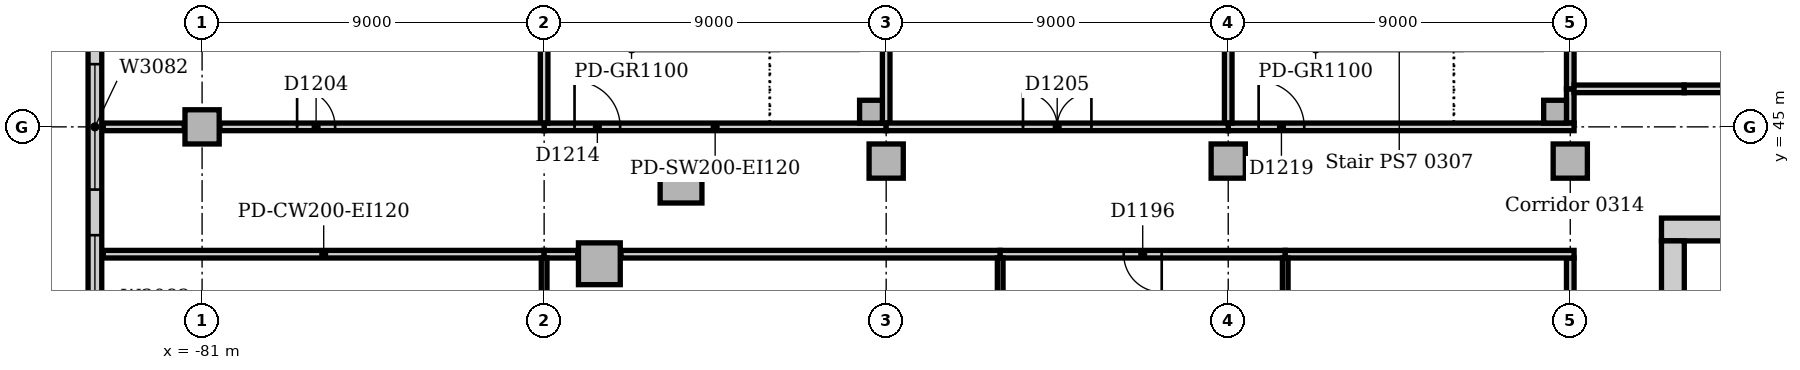
"""IFC4 building model, lengths in metres.
Left out: names, types, materials, properties, quantities, classifications, styles, units other than length and angle.
Written with IfcOpenShell. Run it as: python <this file> out.ifc"""

import sys

from ifc_helpers import new_model, si_unit, direction, frame, frame_2d, origin, origin_2d, place, context, subcontext, project, spatial, rectangle, extrude, element, fill, save


model = new_model("IFC4")
c1 = context("Model", 3, precision=1e-05, world=origin(), true_north=direction((0.0, 1.0)))
c2 = subcontext(c1, "Body", "Model", "MODEL_VIEW")
j1 = project(units=[si_unit("LENGTHUNIT", "METRE"), si_unit("PLANEANGLEUNIT", "RADIAN")], contexts=[c1])
p1 = place(None, origin())
s1 = spatial("IfcSite", under=j1, at=p1, CompositionType="ELEMENT")
p2 = place(p1, origin())
s2 = spatial("IfcBuilding", under=s1, at=p2, CompositionType="ELEMENT")
p3 = place(p2, frame((0.0, 0.0, 16.0)))
s3 = spatial("IfcBuildingStorey", under=s2, at=p3, CompositionType="ELEMENT", Elevation=16.0)
p4 = place(p3, frame((-30.9, 42.3, 0.0), z_axis=(0.0, 0.0, 1.0), x_axis=(-1.0, 0.0, 0.0)))
e1 = element("IfcWall", 1, at=p4, inside=s3, PredefinedType="SOLIDWALL", context=c2, shape_type="SweptSolid", body=[
    extrude(rectangle(XDim=11.7, YDim=0.6, at=frame_2d((5.85, 0.0))), origin(), (0.0, 0.0, 1.0), 5.0),
])
p5 = place(p3, frame((-42.3, 42.0, 0.0), z_axis=(0.0, 0.0, 1.0), x_axis=(0.0, -1.0, 0.0)))
e2 = element("IfcWall", 2, at=p5, inside=s3, PredefinedType="SOLIDWALL", context=c2, shape_type="SweptSolid", body=[
    extrude(rectangle(XDim=11.5, YDim=0.6, at=frame_2d((5.75, 0.0))), origin(), (0.0, 0.0, 1.0), 5.0),
])
p6 = place(p5, frame((8.85, 0.0, 0.0)))
e3 = element("IfcOpeningElement", 3, at=p6, cuts=e2, PredefinedType="OPENING", context=c2, shape_type="SweptSolid", body=[
    extrude(rectangle(XDim=1.8, YDim=2.1, at=frame_2d((0.9, 1.05))), frame((0.0, 0.31, 0.0), z_axis=(0.0, -1.0, 0.0), x_axis=(1.0, 0.0, 0.0)), (0.0, 0.0, 1.0), 0.62),
])
for number, where, z_axis, x_axis in (
    (4, (-68.398, 43.547, 0.0), (0.0, 0.0, 1.0), (1.0, 0.0, 0.0)),
    (5, (-70.547, 41.398, 0.0), (0.0, 0.0, 1.0), (1.0, 0.0, 0.0)),
):
    element("IfcColumn", number, at=place(p3, frame(where, z_axis=z_axis, x_axis=x_axis)), inside=s3, PredefinedType="COLUMN", context=c2, shape_type="SweptSolid", body=[
        extrude(rectangle(XDim=1.1, YDim=1.1, at=origin_2d()), origin(), (0.0, 0.0, 1.0), 4.7),
    ])
for number, where, z_axis, x_axis in (
    (6, (-63.0, 44.1, 0.0), (0.0, 0.0, 1.0), (1.0, 0.0, 0.0)),
    (7, (-54.0, 44.1, 0.0), (0.0, 0.0, 1.0), (1.0, 0.0, 0.0)),
    (8, (-45.0, 44.1, 0.0), (0.0, 0.0, 1.0), (1.0, 0.0, 0.0)),
    (9, (-81.0, 45.0, 0.0), (0.0, 0.0, 1.0), (1.0, 0.0, 0.0)),
):
    element("IfcColumn", number, at=place(p3, frame(where, z_axis=z_axis, x_axis=x_axis)), inside=s3, PredefinedType="COLUMN", context=c2, shape_type="SweptSolid", body=[
        extrude(rectangle(XDim=0.9, YDim=0.9, at=origin_2d()), origin(), (0.0, 0.0, 1.0), 4.7),
    ])
p7 = place(p3, frame((-83.82, 54.0, 0.0), z_axis=(0.0, 0.0, 1.0), x_axis=(0.0, -1.0, 0.0)))
e10 = element("IfcWall", 10, at=p7, inside=s3, PredefinedType="STANDARD", context=c2, shape_type="SweptSolid", body=[
    extrude(rectangle(XDim=63.0, YDim=0.36, at=frame_2d((31.5, 0.0))), origin(), (0.0, 0.0, 1.0), 4.7),
])
p8 = place(p7, frame((2.85, 0.0, 0.9)))
e11 = element("IfcOpeningElement", 11, at=p8, cuts=e10, PredefinedType="OPENING", context=c2, shape_type="SweptSolid", body=[
    extrude(rectangle(XDim=3.3, YDim=2.4, at=frame_2d((1.65, 1.2))), frame((0.0, 0.19, 0.0), z_axis=(0.0, -1.0, 0.0), x_axis=(1.0, 0.0, 0.0)), (0.0, 0.0, 1.0), 0.38),
])
p9 = place(p7, frame((7.35, 0.0, 0.9)))
e12 = element("IfcOpeningElement", 12, at=p9, cuts=e10, PredefinedType="OPENING", context=c2, shape_type="SweptSolid", body=[
    extrude(rectangle(XDim=3.3, YDim=2.4, at=frame_2d((1.65, 1.2))), frame((0.0, 0.19, 0.0), z_axis=(0.0, -1.0, 0.0), x_axis=(1.0, 0.0, 0.0)), (0.0, 0.0, 1.0), 0.38),
])
p10 = place(p7, frame((11.85, 0.0, 0.9)))
e13 = element("IfcOpeningElement", 13, at=p10, cuts=e10, PredefinedType="OPENING", context=c2, shape_type="SweptSolid", body=[
    extrude(rectangle(XDim=3.3, YDim=2.4, at=frame_2d((1.65, 1.2))), frame((0.0, 0.19, 0.0), z_axis=(0.0, -1.0, 0.0), x_axis=(1.0, 0.0, 0.0)), (0.0, 0.0, 1.0), 0.38),
])
p11 = place(p7, frame((16.35, 0.0, 0.9)))
e14 = element("IfcOpeningElement", 14, at=p11, cuts=e10, PredefinedType="OPENING", context=c2, shape_type="SweptSolid", body=[
    extrude(rectangle(XDim=3.3, YDim=2.4, at=frame_2d((1.65, 1.2))), frame((0.0, 0.19, 0.0), z_axis=(0.0, -1.0, 0.0), x_axis=(1.0, 0.0, 0.0)), (0.0, 0.0, 1.0), 0.38),
])
p12 = place(p7, frame((20.85, 0.0, 0.9)))
e15 = element("IfcOpeningElement", 15, at=p12, cuts=e10, PredefinedType="OPENING", context=c2, shape_type="SweptSolid", body=[
    extrude(rectangle(XDim=3.3, YDim=2.4, at=frame_2d((1.65, 1.2))), frame((0.0, 0.19, 0.0), z_axis=(0.0, -1.0, 0.0), x_axis=(1.0, 0.0, 0.0)), (0.0, 0.0, 1.0), 0.38),
])
p13 = place(p7, frame((25.35, 0.0, 0.9)))
e16 = element("IfcOpeningElement", 16, at=p13, cuts=e10, PredefinedType="OPENING", context=c2, shape_type="SweptSolid", body=[
    extrude(rectangle(XDim=3.3, YDim=2.4, at=frame_2d((1.65, 1.2))), frame((0.0, 0.19, 0.0), z_axis=(0.0, -1.0, 0.0), x_axis=(1.0, 0.0, 0.0)), (0.0, 0.0, 1.0), 0.38),
])
p14 = place(p7, frame((29.85, 0.0, 0.9)))
e17 = element("IfcOpeningElement", 17, at=p14, cuts=e10, PredefinedType="OPENING", context=c2, shape_type="SweptSolid", body=[
    extrude(rectangle(XDim=3.3, YDim=2.4, at=frame_2d((1.65, 1.2))), frame((0.0, 0.19, 0.0), z_axis=(0.0, -1.0, 0.0), x_axis=(1.0, 0.0, 0.0)), (0.0, 0.0, 1.0), 0.38),
])
p15 = place(p7, frame((34.35, 0.0, 0.9)))
e18 = element("IfcOpeningElement", 18, at=p15, cuts=e10, PredefinedType="OPENING", context=c2, shape_type="SweptSolid", body=[
    extrude(rectangle(XDim=3.3, YDim=2.4, at=frame_2d((1.65, 1.2))), frame((0.0, 0.19, 0.0), z_axis=(0.0, -1.0, 0.0), x_axis=(1.0, 0.0, 0.0)), (0.0, 0.0, 1.0), 0.38),
])
p16 = place(p7, frame((38.85, 0.0, 0.9)))
e19 = element("IfcOpeningElement", 19, at=p16, cuts=e10, PredefinedType="OPENING", context=c2, shape_type="SweptSolid", body=[
    extrude(rectangle(XDim=3.3, YDim=2.4, at=frame_2d((1.65, 1.2))), frame((0.0, 0.19, 0.0), z_axis=(0.0, -1.0, 0.0), x_axis=(1.0, 0.0, 0.0)), (0.0, 0.0, 1.0), 0.38),
])
p17 = place(p7, frame((43.35, 0.0, 0.9)))
e20 = element("IfcOpeningElement", 20, at=p17, cuts=e10, PredefinedType="OPENING", context=c2, shape_type="SweptSolid", body=[
    extrude(rectangle(XDim=3.3, YDim=2.4, at=frame_2d((1.65, 1.2))), frame((0.0, 0.19, 0.0), z_axis=(0.0, -1.0, 0.0), x_axis=(1.0, 0.0, 0.0)), (0.0, 0.0, 1.0), 0.38),
])
p18 = place(p7, frame((47.85, 0.0, 0.9)))
e21 = element("IfcOpeningElement", 21, at=p18, cuts=e10, PredefinedType="OPENING", context=c2, shape_type="SweptSolid", body=[
    extrude(rectangle(XDim=3.3, YDim=2.4, at=frame_2d((1.65, 1.2))), frame((0.0, 0.19, 0.0), z_axis=(0.0, -1.0, 0.0), x_axis=(1.0, 0.0, 0.0)), (0.0, 0.0, 1.0), 0.38),
])
p19 = place(p7, frame((52.35, 0.0, 0.9)))
e22 = element("IfcOpeningElement", 22, at=p19, cuts=e10, PredefinedType="OPENING", context=c2, shape_type="SweptSolid", body=[
    extrude(rectangle(XDim=3.3, YDim=2.4, at=frame_2d((1.65, 1.2))), frame((0.0, 0.19, 0.0), z_axis=(0.0, -1.0, 0.0), x_axis=(1.0, 0.0, 0.0)), (0.0, 0.0, 1.0), 0.38),
])
p20 = place(p7, frame((56.85, 0.0, 0.9)))
e23 = element("IfcOpeningElement", 23, at=p20, cuts=e10, PredefinedType="OPENING", context=c2, shape_type="SweptSolid", body=[
    extrude(rectangle(XDim=3.3, YDim=2.4, at=frame_2d((1.65, 1.2))), frame((0.0, 0.19, 0.0), z_axis=(0.0, -1.0, 0.0), x_axis=(1.0, 0.0, 0.0)), (0.0, 0.0, 1.0), 0.38),
])
for number, where, z_axis, x_axis in (
    (24, (-63.4, 45.4, 0.0), (0.0, 0.0, 1.0), (1.0, 0.0, 0.0)),
    (25, (-45.4, 45.4, 0.0), (0.0, 0.0, 1.0), (1.0, 0.0, 0.0)),
):
    element("IfcColumn", number, at=place(p3, frame(where, z_axis=z_axis, x_axis=x_axis)), inside=s3, PredefinedType="COLUMN", context=c2, shape_type="SweptSolid", body=[
        extrude(rectangle(XDim=0.6, YDim=0.6, at=origin_2d()), origin(), (0.0, 0.0, 1.0), 5.0),
    ])
p21 = place(p3, frame((-72.0, 45.0, 0.0), z_axis=(0.0, 0.0, 1.0), x_axis=(1.0, 0.0, 0.0)))
e26 = element("IfcWall", 26, at=p21, inside=s3, PredefinedType="SOLIDWALL", context=c2, shape_type="SweptSolid", body=[
    extrude(rectangle(XDim=9.0, YDim=0.2, at=frame_2d((4.5, 0.0))), origin(), (0.0, 0.0, 1.0), 4.7),
])
p22 = place(p21, frame((0.8, 0.0, 0.0)))
e27 = element("IfcOpeningElement", 27, at=p22, cuts=e26, PredefinedType="OPENING", context=c2, shape_type="SweptSolid", body=[
    extrude(rectangle(XDim=1.2, YDim=2.1, at=frame_2d((0.6, 1.05))), frame((0.0, 0.11, 0.0), z_axis=(0.0, -1.0, 0.0), x_axis=(1.0, 0.0, 0.0)), (0.0, 0.0, 1.0), 0.22),
])
p23 = place(p3, frame((-72.0, 45.1, 0.0), z_axis=(0.0, 0.0, 1.0), x_axis=(0.0, 1.0, 0.0)))
e28 = element("IfcWall", 28, at=p23, inside=s3, PredefinedType="SOLIDWALL", context=c2, shape_type="SweptSolid", body=[
    extrude(rectangle(XDim=5.25, YDim=0.2, at=frame_2d((2.625, 0.0))), origin(), (0.0, 0.0, 1.0), 4.7),
])
p24 = place(p3, frame((-63.0, 45.1, 0.0), z_axis=(0.0, 0.0, 1.0), x_axis=(0.0, 1.0, 0.0)))
e29 = element("IfcWall", 29, at=p24, inside=s3, PredefinedType="SOLIDWALL", context=c2, shape_type="SweptSolid", body=[
    extrude(rectangle(XDim=5.15, YDim=0.2, at=frame_2d((2.575, 0.0))), origin(), (0.0, 0.0, 1.0), 4.7),
])
p25 = place(p3, frame((-45.0, 45.1, 0.0), z_axis=(0.0, 0.0, 1.0), x_axis=(0.0, 1.0, 0.0)))
e30 = element("IfcWall", 30, at=p25, inside=s3, PredefinedType="SOLIDWALL", context=c2, shape_type="SweptSolid", body=[
    extrude(rectangle(XDim=0.9, YDim=0.2, at=frame_2d((0.45, 0.0))), origin(), (0.0, 0.0, 1.0), 4.7),
])
p26 = place(p3, frame((-54.0, 45.0, 0.0), z_axis=(0.0, 0.0, 1.0), x_axis=(1.0, 0.0, 0.0)))
e31 = element("IfcWall", 31, at=p26, inside=s3, PredefinedType="SOLIDWALL", context=c2, shape_type="SweptSolid", body=[
    extrude(rectangle(XDim=9.1, YDim=0.2, at=frame_2d((4.55, 0.0))), origin(), (0.0, 0.0, 1.0), 4.7),
])
p27 = place(p26, frame((0.8, 0.0, 0.0)))
e32 = element("IfcOpeningElement", 32, at=p27, cuts=e31, PredefinedType="OPENING", context=c2, shape_type="SweptSolid", body=[
    extrude(rectangle(XDim=1.2, YDim=2.1, at=frame_2d((0.6, 1.05))), frame((0.0, 0.11, 0.0), z_axis=(0.0, -1.0, 0.0), x_axis=(1.0, 0.0, 0.0)), (0.0, 0.0, 1.0), 0.22),
])
p28 = place(p3, frame((-54.0, 45.1, 0.0), z_axis=(0.0, 0.0, 1.0), x_axis=(0.0, 1.0, 0.0)))
e33 = element("IfcWall", 33, at=p28, inside=s3, PredefinedType="SOLIDWALL", context=c2, shape_type="SweptSolid", body=[
    extrude(rectangle(XDim=5.15, YDim=0.2, at=frame_2d((2.575, 0.0))), origin(), (0.0, 0.0, 1.0), 4.7),
])
p29 = place(p3, frame((-45.0, 46.0, 0.0), z_axis=(0.0, 0.0, 1.0), x_axis=(0.0, 1.0, 0.0)))
e34 = element("IfcWall", 34, at=p29, inside=s3, PredefinedType="SOLIDWALL", context=c2, shape_type="SweptSolid", body=[
    extrude(rectangle(XDim=4.35, YDim=0.2, at=frame_2d((2.175, 0.0))), origin(), (0.0, 0.0, 1.0), 4.7),
])
p30 = place(p3, frame((-45.0, 36.42, 0.0), z_axis=(0.0, 0.0, 1.0), x_axis=(0.0, 1.0, 0.0)))
e35 = element("IfcWall", 35, at=p30, inside=s3, PredefinedType="PARTITIONING", context=c2, shape_type="SweptSolid", body=[
    extrude(rectangle(XDim=5.13, YDim=0.2, at=frame_2d((2.565, 0.0))), origin(), (0.0, 0.0, 1.0), 4.7),
])
p31 = place(p3, frame((-83.6, 41.65, 0.0), z_axis=(0.0, 0.0, 1.0), x_axis=(1.0, 0.0, 0.0)))
e36 = element("IfcWall", 36, at=p31, inside=s3, PredefinedType="PARTITIONING", context=c2, shape_type="SweptSolid", body=[
    extrude(rectangle(XDim=11.6, YDim=0.2, at=frame_2d((5.8, 0.0))), origin(), (0.0, 0.0, 1.0), 4.7),
])
p32 = place(p3, frame((-72.0, 41.65, 0.0), z_axis=(0.0, 0.0, 1.0), x_axis=(1.0, 0.0, 0.0)))
e37 = element("IfcWall", 37, at=p32, inside=s3, PredefinedType="PARTITIONING", context=c2, shape_type="SweptSolid", body=[
    extrude(rectangle(XDim=0.883, YDim=0.2, at=frame_2d((0.442, 0.0))), origin(), (0.0, 0.0, 1.0), 4.7),
])
p33 = place(p3, frame((-69.977, 41.65, 0.0), z_axis=(0.0, 0.0, 1.0), x_axis=(1.0, 0.0, 0.0)))
e38 = element("IfcWall", 38, at=p33, inside=s3, PredefinedType="PARTITIONING", context=c2, shape_type="SweptSolid", body=[
    extrude(rectangle(XDim=9.977, YDim=0.2, at=frame_2d((4.989, 0.0))), origin(), (0.0, 0.0, 1.0), 4.7),
])
p34 = place(p3, frame((-60.0, 41.65, 0.0), z_axis=(0.0, 0.0, 1.0), x_axis=(1.0, 0.0, 0.0)))
e39 = element("IfcWall", 39, at=p34, inside=s3, PredefinedType="PARTITIONING", context=c2, shape_type="SweptSolid", body=[
    extrude(rectangle(XDim=7.5, YDim=0.2, at=frame_2d((3.75, 0.0))), origin(), (0.0, 0.0, 1.0), 4.7),
])
p35 = place(p34, frame((3.25, 0.0, 0.0)))
e40 = element("IfcOpeningElement", 40, at=p35, cuts=e39, PredefinedType="OPENING", context=c2, shape_type="SweptSolid", body=[
    extrude(rectangle(XDim=1.0, YDim=2.1, at=frame_2d((0.5, 1.05))), frame((0.0, 0.11, 0.0), z_axis=(0.0, -1.0, 0.0), x_axis=(1.0, 0.0, 0.0)), (0.0, 0.0, 1.0), 0.22),
])
p36 = place(p3, frame((-52.5, 41.65, 0.0), z_axis=(0.0, 0.0, 1.0), x_axis=(1.0, 0.0, 0.0)))
e41 = element("IfcWall", 41, at=p36, inside=s3, PredefinedType="PARTITIONING", context=c2, shape_type="SweptSolid", body=[
    extrude(rectangle(XDim=7.6, YDim=0.2, at=frame_2d((3.8, 0.0))), origin(), (0.0, 0.0, 1.0), 4.7),
])
p37 = place(p3, frame((-83.6, 45.0, 0.0), z_axis=(0.0, 0.0, 1.0), x_axis=(1.0, 0.0, 0.0)))
e42 = element("IfcWall", 42, at=p37, inside=s3, PredefinedType="PARTITIONING", context=c2, shape_type="SweptSolid", body=[
    extrude(rectangle(XDim=2.13, YDim=0.2, at=frame_2d((1.065, 0.0))), origin(), (0.0, 0.0, 1.0), 4.7),
])
p38 = place(p3, frame((-80.53, 45.0, 0.0), z_axis=(0.0, 0.0, 1.0), x_axis=(1.0, 0.0, 0.0)))
e43 = element("IfcWall", 43, at=p38, inside=s3, PredefinedType="PARTITIONING", context=c2, shape_type="SweptSolid", body=[
    extrude(rectangle(XDim=8.53, YDim=0.2, at=frame_2d((4.265, 0.0))), origin(), (0.0, 0.0, 1.0), 4.7),
])
p39 = place(p38, frame((2.03, 0.0, 0.0)))
e44 = element("IfcOpeningElement", 44, at=p39, cuts=e43, PredefinedType="OPENING", context=c2, shape_type="SweptSolid", body=[
    extrude(rectangle(XDim=1.0, YDim=2.1, at=frame_2d((0.5, 1.05))), frame((0.0, 0.11, 0.0), z_axis=(0.0, -1.0, 0.0), x_axis=(1.0, 0.0, 0.0)), (0.0, 0.0, 1.0), 0.22),
])
p40 = place(p3, frame((-63.0, 45.0, 0.0), z_axis=(0.0, 0.0, 1.0), x_axis=(1.0, 0.0, 0.0)))
e45 = element("IfcWall", 45, at=p40, inside=s3, PredefinedType="PARTITIONING", context=c2, shape_type="SweptSolid", body=[
    extrude(rectangle(XDim=9.0, YDim=0.2, at=frame_2d((4.5, 0.0))), origin(), (0.0, 0.0, 1.0), 4.7),
])
p41 = place(p40, frame((3.6, 0.0, 0.0)))
e46 = element("IfcOpeningElement", 46, at=p41, cuts=e45, PredefinedType="OPENING", context=c2, shape_type="SweptSolid", body=[
    extrude(rectangle(XDim=1.8, YDim=2.1, at=frame_2d((0.9, 1.05))), frame((0.0, 0.11, 0.0), z_axis=(0.0, -1.0, 0.0), x_axis=(1.0, 0.0, 0.0)), (0.0, 0.0, 1.0), 0.22),
])
p42 = place(p3, frame((-44.9, 46.0, 0.0), z_axis=(0.0, 0.0, 1.0), x_axis=(1.0, 0.0, 0.0)))
e47 = element("IfcWall", 47, at=p42, inside=s3, PredefinedType="PARTITIONING", context=c2, shape_type="SweptSolid", body=[
    extrude(rectangle(XDim=2.9, YDim=0.2, at=frame_2d((1.45, 0.0))), origin(), (0.0, 0.0, 1.0), 4.7),
])
p43 = place(p3, frame((-42.0, 46.0, 0.0), z_axis=(0.0, 0.0, 1.0), x_axis=(1.0, 0.0, 0.0)))
e48 = element("IfcWall", 48, at=p43, inside=s3, PredefinedType="PARTITIONING", context=c2, shape_type="SweptSolid", body=[
    extrude(rectangle(XDim=6.0, YDim=0.2, at=frame_2d((3.0, 0.0))), origin(), (0.0, 0.0, 1.0), 4.7),
])
p44 = place(p43, frame((2.5, 0.0, 0.0)))
e49 = element("IfcOpeningElement", 49, at=p44, cuts=e48, PredefinedType="OPENING", context=c2, shape_type="SweptSolid", body=[
    extrude(rectangle(XDim=1.0, YDim=2.1, at=frame_2d((0.5, 1.05))), frame((0.0, 0.11, 0.0), z_axis=(0.0, -1.0, 0.0), x_axis=(1.0, 0.0, 0.0)), (0.0, 0.0, 1.0), 0.22),
])
p45 = place(p3, frame((-72.0, 24.1, 0.0), z_axis=(0.0, 0.0, 1.0), x_axis=(0.0, 1.0, 0.0)))
e50 = element("IfcWall", 50, at=p45, inside=s3, PredefinedType="PARTITIONING", context=c2, shape_type="SweptSolid", body=[
    extrude(rectangle(XDim=17.45, YDim=0.15, at=frame_2d((8.725, 0.0))), origin(), (0.0, 0.0, 1.0), 4.7),
])
for number, where, z_axis, x_axis in (
    (51, (-60.0, 33.75, 0.0), (0.0, 0.0, 1.0), (0.0, 1.0, 0.0)),
    (52, (-52.5, 33.75, 0.0), (0.0, 0.0, 1.0), (0.0, 1.0, 0.0)),
):
    element("IfcWall", number, at=place(p3, frame(where, z_axis=z_axis, x_axis=x_axis)), inside=s3, PredefinedType="PARTITIONING", context=c2, shape_type="SweptSolid", body=[
        extrude(rectangle(XDim=7.8, YDim=0.15, at=frame_2d((3.9, 0.0))), origin(), (0.0, 0.0, 1.0), 4.7),
    ])
p46 = place(p9, origin())
e53 = element("IfcWindow", 53, at=p46, inside=s3, PartitioningType="SINGLE_PANEL", PredefinedType="WINDOW", context=c2, shape_type="SweptSolid", body=[
    extrude(rectangle(XDim=3.3, YDim=2.4, at=frame_2d((1.65, 1.2))), frame((0.0, 0.13, 0.0), z_axis=(0.0, -1.0, 0.0), x_axis=(1.0, 0.0, 0.0)), (0.0, 0.0, 1.0), 0.06),
])
fill(e12, e53)
p47 = place(p10, origin())
e54 = element("IfcWindow", 54, at=p47, inside=s3, PartitioningType="SINGLE_PANEL", PredefinedType="WINDOW", context=c2, shape_type="SweptSolid", body=[
    extrude(rectangle(XDim=3.3, YDim=2.4, at=frame_2d((1.65, 1.2))), frame((0.0, 0.13, 0.0), z_axis=(0.0, -1.0, 0.0), x_axis=(1.0, 0.0, 0.0)), (0.0, 0.0, 1.0), 0.06),
])
fill(e13, e54)
p48 = place(p35, frame((1.0, 0.0, 0.0), z_axis=(0.0, 0.0, 1.0), x_axis=(-1.0, 0.0, 0.0)))
e55 = element("IfcDoor", 55, at=p48, inside=s3, OperationType="SINGLE_SWING_LEFT", PredefinedType="DOOR", context=c2, shape_type="SweptSolid", body=[
    extrude(rectangle(XDim=1.0, YDim=2.1, at=frame_2d((0.5, 1.05))), frame((0.0, 0.025, 0.0), z_axis=(0.0, -1.0, 0.0), x_axis=(1.0, 0.0, 0.0)), (0.0, 0.0, 1.0), 0.05),
])
fill(e40, e55)
p49 = place(p39, origin())
e56 = element("IfcDoor", 56, at=p49, inside=s3, OperationType="SINGLE_SWING_LEFT", PredefinedType="DOOR", context=c2, shape_type="SweptSolid", body=[
    extrude(rectangle(XDim=1.0, YDim=2.1, at=frame_2d((0.5, 1.05))), frame((0.0, 0.025, 0.0), z_axis=(0.0, -1.0, 0.0), x_axis=(1.0, 0.0, 0.0)), (0.0, 0.0, 1.0), 0.05),
])
fill(e44, e56)
p50 = place(p41, origin())
e57 = element("IfcDoor", 57, at=p50, inside=s3, OperationType="DOUBLE_DOOR_SINGLE_SWING", PredefinedType="DOOR", context=c2, shape_type="SweptSolid", body=[
    extrude(rectangle(XDim=1.8, YDim=2.1, at=frame_2d((0.9, 1.05))), frame((0.0, 0.025, 0.0), z_axis=(0.0, -1.0, 0.0), x_axis=(1.0, 0.0, 0.0)), (0.0, 0.0, 1.0), 0.05),
])
fill(e46, e57)
p51 = place(p22, origin())
e58 = element("IfcDoor", 58, at=p51, inside=s3, OperationType="SINGLE_SWING_LEFT", PredefinedType="DOOR", context=c2, shape_type="SweptSolid", body=[
    extrude(rectangle(XDim=1.2, YDim=2.1, at=frame_2d((0.6, 1.05))), frame((0.0, 0.025, 0.0), z_axis=(0.0, -1.0, 0.0), x_axis=(1.0, 0.0, 0.0)), (0.0, 0.0, 1.0), 0.05),
])
fill(e27, e58)
p52 = place(p27, origin())
e59 = element("IfcDoor", 59, at=p52, inside=s3, OperationType="SINGLE_SWING_LEFT", PredefinedType="DOOR", context=c2, shape_type="SweptSolid", body=[
    extrude(rectangle(XDim=1.2, YDim=2.1, at=frame_2d((0.6, 1.05))), frame((0.0, 0.025, 0.0), z_axis=(0.0, -1.0, 0.0), x_axis=(1.0, 0.0, 0.0)), (0.0, 0.0, 1.0), 0.05),
])
fill(e32, e59)
save(model, sys.argv[1])
